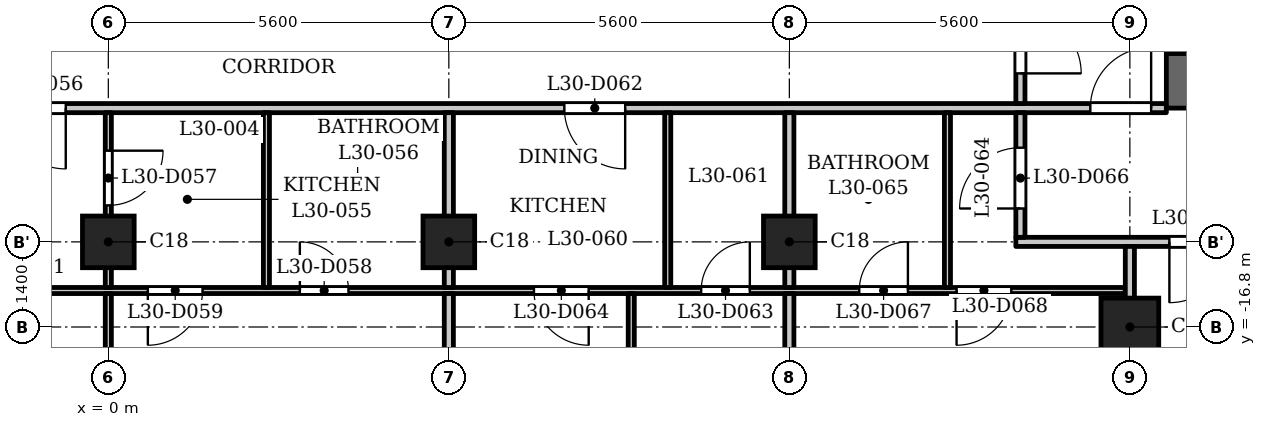
"""IFC4 building model, lengths in metres.
Left out: names, types, materials, properties, quantities, classifications, styles, units other than length and angle.
Written with IfcOpenShell. Run it as: python <this file> out.ifc"""

import sys

from ifc_helpers import new_model, si_unit, direction, frame, frame_2d, origin, origin_2d, place, context, subcontext, project, spatial, rectangle, extrude, element, fill, save


model = new_model("IFC4")
c1 = context("Model", 3, precision=1e-05, world=origin(), true_north=direction((0.0, 1.0)))
c2 = subcontext(c1, "Body", "Model", "MODEL_VIEW")
j1 = project(units=[si_unit("LENGTHUNIT", "METRE"), si_unit("PLANEANGLEUNIT", "RADIAN")], contexts=[c1])
p1 = place(None, origin())
s1 = spatial("IfcSite", under=j1, at=p1, CompositionType="ELEMENT")
p2 = place(p1, origin())
s2 = spatial("IfcBuilding", under=s1, at=p2, CompositionType="ELEMENT")
p3 = place(p2, frame((0.0, 0.0, 118.3)))
s3 = spatial("IfcBuildingStorey", under=s2, at=p3, CompositionType="ELEMENT", Elevation=118.3)
p4 = place(p3, frame((16.8, -16.8, 0.0), z_axis=(0.0, 0.0, 1.0), x_axis=(1.0, 0.0, 0.0)))
e1 = element("IfcColumn", 1, at=p4, inside=s3, PredefinedType="COLUMN", context=c2, shape_type="SweptSolid", body=[
    extrude(rectangle(XDim=0.95, YDim=0.95, at=origin_2d()), origin(), (0.0, 0.0, 1.0), 3.5),
])
for number, where, z_axis, x_axis in (
    (2, (0.0, -15.4, 0.0), (0.0, 0.0, 1.0), (1.0, 0.0, 0.0)),
    (3, (5.6, -15.4, 0.0), (0.0, 0.0, 1.0), (1.0, 0.0, 0.0)),
    (4, (11.2, -15.4, 0.0), (0.0, 0.0, 1.0), (1.0, 0.0, 0.0)),
):
    element("IfcColumn", number, at=place(p3, frame(where, z_axis=z_axis, x_axis=x_axis)), inside=s3, PredefinedType="COLUMN", context=c2, shape_type="SweptSolid", body=[
        extrude(rectangle(XDim=0.85, YDim=0.85, at=origin_2d()), origin(), (0.0, 0.0, 1.0), 3.5),
    ])
p5 = place(p3, frame((17.4, -12.75, 0.0), z_axis=(0.0, 0.0, 1.0), x_axis=(1.0, 0.0, 0.0)))
e5 = element("IfcWall", 5, at=p5, inside=s3, PredefinedType="SHEAR", context=c2, shape_type="SweptSolid", body=[
    extrude(rectangle(XDim=10.4, YDim=0.9, at=frame_2d((5.2, 0.0))), origin(), (0.0, 0.0, 1.0), 3.2),
])
p6 = place(p3, frame((17.6, -12.3, 0.0), z_axis=(0.0, 0.0, 1.0), x_axis=(0.0, 1.0, 0.0)))
e6 = element("IfcWall", 6, at=p6, inside=s3, PredefinedType="SHEAR", context=c2, shape_type="SweptSolid", body=[
    extrude(rectangle(XDim=24.6, YDim=0.4, at=frame_2d((12.3, 0.0))), origin(), (0.0, 0.0, 1.0), 3.2),
])
p7 = place(p6, frame((6.0, 0.0, 0.0)))
e7 = element("IfcOpeningElement", 7, at=p7, cuts=e6, PredefinedType="OPENING", context=c2, shape_type="SweptSolid", body=[
    extrude(rectangle(XDim=1.1, YDim=2.1, at=frame_2d((0.55, 1.05))), frame((0.0, 0.21, 0.0), z_axis=(0.0, -1.0, 0.0), x_axis=(1.0, 0.0, 0.0)), (0.0, 0.0, 1.0), 0.42),
])
p8 = place(p6, frame((8.4, 0.0, 0.0)))
e8 = element("IfcOpeningElement", 8, at=p8, cuts=e6, PredefinedType="OPENING", context=c2, shape_type="SweptSolid", body=[
    extrude(rectangle(XDim=1.1, YDim=2.1, at=frame_2d((0.55, 1.05))), frame((0.0, 0.21, 0.0), z_axis=(0.0, -1.0, 0.0), x_axis=(1.0, 0.0, 0.0)), (0.0, 0.0, 1.0), 0.42),
])
p9 = place(p6, frame((10.8, 0.0, 0.0)))
e9 = element("IfcOpeningElement", 9, at=p9, cuts=e6, PredefinedType="OPENING", context=c2, shape_type="SweptSolid", body=[
    extrude(rectangle(XDim=1.1, YDim=2.1, at=frame_2d((0.55, 1.05))), frame((0.0, 0.21, 0.0), z_axis=(0.0, -1.0, 0.0), x_axis=(1.0, 0.0, 0.0)), (0.0, 0.0, 1.0), 0.42),
])
p10 = place(p6, frame((16.75, 0.0, 0.0)))
e10 = element("IfcOpeningElement", 10, at=p10, cuts=e6, PredefinedType="OPENING", context=c2, shape_type="SweptSolid", body=[
    extrude(rectangle(XDim=0.9, YDim=2.1, at=frame_2d((0.45, 1.05))), frame((0.0, 0.21, 0.0), z_axis=(0.0, -1.0, 0.0), x_axis=(1.0, 0.0, 0.0)), (0.0, 0.0, 1.0), 0.42),
])
p11 = place(p6, frame((22.8, 0.0, 0.0)))
e11 = element("IfcOpeningElement", 11, at=p11, cuts=e6, PredefinedType="OPENING", context=c2, shape_type="SweptSolid", body=[
    extrude(rectangle(XDim=1.1, YDim=2.1, at=frame_2d((0.55, 1.05))), frame((0.0, 0.21, 0.0), z_axis=(0.0, -1.0, 0.0), x_axis=(1.0, 0.0, 0.0)), (0.0, 0.0, 1.0), 0.42),
])
p12 = place(p6, frame((0.7, 0.0, 0.0)))
e12 = element("IfcOpeningElement", 12, at=p12, cuts=e6, PredefinedType="OPENING", context=c2, shape_type="SweptSolid", body=[
    extrude(rectangle(XDim=1.1, YDim=2.1, at=frame_2d((0.55, 1.05))), frame((0.0, 0.21, 0.0), z_axis=(0.0, -1.0, 0.0), x_axis=(1.0, 0.0, 0.0)), (0.0, 0.0, 1.0), 0.42),
])
p13 = place(p6, frame((12.775, 0.0, 0.0)))
e13 = element("IfcOpeningElement", 13, at=p13, cuts=e6, PredefinedType="OPENING", context=c2, shape_type="SweptSolid", body=[
    extrude(rectangle(XDim=1.8, YDim=2.1, at=frame_2d((0.9, 1.05))), frame((0.0, 0.21, 0.0), z_axis=(0.0, -1.0, 0.0), x_axis=(1.0, 0.0, 0.0)), (0.0, 0.0, 1.0), 0.42),
])
p14 = place(p3, frame((-16.725, -16.2, 0.0), z_axis=(0.0, 0.0, 1.0), x_axis=(1.0, 0.0, 0.0)))
e14 = element("IfcWall", 14, at=p14, inside=s3, PredefinedType="PARTITIONING", context=c2, shape_type="SweptSolid", body=[
    extrude(rectangle(XDim=33.45, YDim=0.1, at=frame_2d((16.725, 0.0))), origin(), (0.0, 0.0, 1.0), 3.2),
])
p15 = place(p14, frame((4.075, 0.0, 0.0)))
e15 = element("IfcOpeningElement", 15, at=p15, cuts=e14, PredefinedType="OPENING", context=c2, shape_type="SweptSolid", body=[
    extrude(rectangle(XDim=0.8, YDim=2.1, at=frame_2d((0.4, 1.05))), frame((0.0, 0.06, 0.0), z_axis=(0.0, -1.0, 0.0), x_axis=(1.0, 0.0, 0.0)), (0.0, 0.0, 1.0), 0.12),
])
p16 = place(p14, frame((9.425, 0.0, 0.0)))
e16 = element("IfcOpeningElement", 16, at=p16, cuts=e14, PredefinedType="OPENING", context=c2, shape_type="SweptSolid", body=[
    extrude(rectangle(XDim=0.9, YDim=2.1, at=frame_2d((0.45, 1.05))), frame((0.0, 0.06, 0.0), z_axis=(0.0, -1.0, 0.0), x_axis=(1.0, 0.0, 0.0)), (0.0, 0.0, 1.0), 0.12),
])
p17 = place(p14, frame((19.875, 0.0, 0.0)))
e17 = element("IfcOpeningElement", 17, at=p17, cuts=e14, PredefinedType="OPENING", context=c2, shape_type="SweptSolid", body=[
    extrude(rectangle(XDim=0.8, YDim=2.1, at=frame_2d((0.4, 1.05))), frame((0.0, 0.06, 0.0), z_axis=(0.0, -1.0, 0.0), x_axis=(1.0, 0.0, 0.0)), (0.0, 0.0, 1.0), 0.12),
])
p18 = place(p14, frame((17.375, 0.0, 0.0)))
e18 = element("IfcOpeningElement", 18, at=p18, cuts=e14, PredefinedType="OPENING", context=c2, shape_type="SweptSolid", body=[
    extrude(rectangle(XDim=0.9, YDim=2.1, at=frame_2d((0.45, 1.05))), frame((0.0, 0.06, 0.0), z_axis=(0.0, -1.0, 0.0), x_axis=(1.0, 0.0, 0.0)), (0.0, 0.0, 1.0), 0.12),
])
p19 = place(p14, frame((12.525, 0.0, 0.0)))
e19 = element("IfcOpeningElement", 19, at=p19, cuts=e14, PredefinedType="OPENING", context=c2, shape_type="SweptSolid", body=[
    extrude(rectangle(XDim=0.9, YDim=2.1, at=frame_2d((0.45, 1.05))), frame((0.0, 0.06, 0.0), z_axis=(0.0, -1.0, 0.0), x_axis=(1.0, 0.0, 0.0)), (0.0, 0.0, 1.0), 0.12),
])
p20 = place(p14, frame((14.775, 0.0, 0.0)))
e20 = element("IfcOpeningElement", 20, at=p20, cuts=e14, PredefinedType="OPENING", context=c2, shape_type="SweptSolid", body=[
    extrude(rectangle(XDim=0.9, YDim=2.1, at=frame_2d((0.45, 1.05))), frame((0.0, 0.06, 0.0), z_axis=(0.0, -1.0, 0.0), x_axis=(1.0, 0.0, 0.0)), (0.0, 0.0, 1.0), 0.12),
])
p21 = place(p14, frame((26.475, 0.0, 0.0)))
e21 = element("IfcOpeningElement", 21, at=p21, cuts=e14, PredefinedType="OPENING", context=c2, shape_type="SweptSolid", body=[
    extrude(rectangle(XDim=0.8, YDim=2.1, at=frame_2d((0.4, 1.05))), frame((0.0, 0.06, 0.0), z_axis=(0.0, -1.0, 0.0), x_axis=(1.0, 0.0, 0.0)), (0.0, 0.0, 1.0), 0.12),
])
p22 = place(p14, frame((23.725, 0.0, 0.0)))
e22 = element("IfcOpeningElement", 22, at=p22, cuts=e14, PredefinedType="OPENING", context=c2, shape_type="SweptSolid", body=[
    extrude(rectangle(XDim=0.9, YDim=2.1, at=frame_2d((0.45, 1.05))), frame((0.0, 0.06, 0.0), z_axis=(0.0, -1.0, 0.0), x_axis=(1.0, 0.0, 0.0)), (0.0, 0.0, 1.0), 0.12),
])
p23 = place(p14, frame((29.075, 0.0, 0.0)))
e23 = element("IfcOpeningElement", 23, at=p23, cuts=e14, PredefinedType="OPENING", context=c2, shape_type="SweptSolid", body=[
    extrude(rectangle(XDim=0.8, YDim=2.1, at=frame_2d((0.4, 1.05))), frame((0.0, 0.06, 0.0), z_axis=(0.0, -1.0, 0.0), x_axis=(1.0, 0.0, 0.0)), (0.0, 0.0, 1.0), 0.12),
])
p24 = place(p14, frame((30.675, 0.0, 0.0)))
e24 = element("IfcOpeningElement", 24, at=p24, cuts=e14, PredefinedType="OPENING", context=c2, shape_type="SweptSolid", body=[
    extrude(rectangle(XDim=0.9, YDim=2.1, at=frame_2d((0.45, 1.05))), frame((0.0, 0.06, 0.0), z_axis=(0.0, -1.0, 0.0), x_axis=(1.0, 0.0, 0.0)), (0.0, 0.0, 1.0), 0.12),
])
p25 = place(p3, frame((14.925, -15.4, 0.0), z_axis=(0.0, 0.0, 1.0), x_axis=(1.0, 0.0, 0.0)))
e25 = element("IfcWall", 25, at=p25, inside=s3, PredefinedType="PARTITIONING", context=c2, shape_type="SweptSolid", body=[
    extrude(rectangle(XDim=12.559, YDim=0.15, at=frame_2d((6.279, 0.0))), origin(), (0.0, 0.0, 1.0), 3.2),
])
p26 = place(p25, frame((2.525, 0.0, 0.0)))
e26 = element("IfcOpeningElement", 26, at=p26, cuts=e25, PredefinedType="OPENING", context=c2, shape_type="SweptSolid", body=[
    extrude(rectangle(XDim=1.0, YDim=2.1, at=frame_2d((0.5, 1.05))), frame((0.0, 0.085, 0.0), z_axis=(0.0, -1.0, 0.0), x_axis=(1.0, 0.0, 0.0)), (0.0, 0.0, 1.0), 0.17),
])
p27 = place(p3, frame((-17.4, -13.2, 0.0), z_axis=(0.0, 0.0, 1.0), x_axis=(1.0, 0.0, 0.0)))
e27 = element("IfcWall", 27, at=p27, inside=s3, PredefinedType="PARTITIONING", context=c2, shape_type="SweptSolid", body=[
    extrude(rectangle(XDim=34.8, YDim=0.15, at=frame_2d((17.4, 0.0))), origin(), (0.0, 0.0, 1.0), 3.2),
])
p28 = place(p27, frame((0.15, 0.0, 0.0)))
e28 = element("IfcOpeningElement", 28, at=p28, cuts=e27, PredefinedType="OPENING", context=c2, shape_type="SweptSolid", body=[
    extrude(rectangle(XDim=1.0, YDim=2.1, at=frame_2d((0.5, 1.05))), frame((0.0, 0.085, 0.0), z_axis=(0.0, -1.0, 0.0), x_axis=(1.0, 0.0, 0.0)), (0.0, 0.0, 1.0), 0.17),
])
p29 = place(p27, frame((33.55, 0.0, 0.0)))
e29 = element("IfcOpeningElement", 29, at=p29, cuts=e27, PredefinedType="OPENING", context=c2, shape_type="SweptSolid", body=[
    extrude(rectangle(XDim=1.0, YDim=2.1, at=frame_2d((0.5, 1.05))), frame((0.0, 0.085, 0.0), z_axis=(0.0, -1.0, 0.0), x_axis=(1.0, 0.0, 0.0)), (0.0, 0.0, 1.0), 0.17),
])
p30 = place(p27, frame((10.1, 0.0, 0.0)))
e30 = element("IfcOpeningElement", 30, at=p30, cuts=e27, PredefinedType="OPENING", context=c2, shape_type="SweptSolid", body=[
    extrude(rectangle(XDim=1.0, YDim=2.1, at=frame_2d((0.5, 1.05))), frame((0.0, 0.085, 0.0), z_axis=(0.0, -1.0, 0.0), x_axis=(1.0, 0.0, 0.0)), (0.0, 0.0, 1.0), 0.17),
])
p31 = place(p27, frame((15.7, 0.0, 0.0)))
e31 = element("IfcOpeningElement", 31, at=p31, cuts=e27, PredefinedType="OPENING", context=c2, shape_type="SweptSolid", body=[
    extrude(rectangle(XDim=1.0, YDim=2.1, at=frame_2d((0.5, 1.05))), frame((0.0, 0.085, 0.0), z_axis=(0.0, -1.0, 0.0), x_axis=(1.0, 0.0, 0.0)), (0.0, 0.0, 1.0), 0.17),
])
p32 = place(p27, frame((24.9, 0.0, 0.0)))
e32 = element("IfcOpeningElement", 32, at=p32, cuts=e27, PredefinedType="OPENING", context=c2, shape_type="SweptSolid", body=[
    extrude(rectangle(XDim=1.0, YDim=2.1, at=frame_2d((0.5, 1.05))), frame((0.0, 0.085, 0.0), z_axis=(0.0, -1.0, 0.0), x_axis=(1.0, 0.0, 0.0)), (0.0, 0.0, 1.0), 0.17),
])
p33 = place(p3, frame((0.0, -22.98, 0.0), z_axis=(0.0, 0.0, 1.0), x_axis=(0.0, 1.0, 0.0)))
e33 = element("IfcWall", 33, at=p33, inside=s3, PredefinedType="PARTITIONING", context=c2, shape_type="SweptSolid", body=[
    extrude(rectangle(XDim=6.73, YDim=0.1, at=frame_2d((3.365, 0.0))), origin(), (0.0, 0.0, 1.0), 3.2),
])
p34 = place(p3, frame((0.0, -16.15, 0.0), z_axis=(0.0, 0.0, 1.0), x_axis=(0.0, 1.0, 0.0)))
e34 = element("IfcWall", 34, at=p34, inside=s3, PredefinedType="PARTITIONING", context=c2, shape_type="SweptSolid", body=[
    extrude(rectangle(XDim=2.875, YDim=0.1, at=frame_2d((1.438, 0.0))), origin(), (0.0, 0.0, 1.0), 3.2),
])
p35 = place(p34, frame((1.35, 0.0, 0.0)))
e35 = element("IfcOpeningElement", 35, at=p35, cuts=e34, PredefinedType="OPENING", context=c2, shape_type="SweptSolid", body=[
    extrude(rectangle(XDim=0.9, YDim=2.1, at=frame_2d((0.45, 1.05))), frame((0.0, 0.06, 0.0), z_axis=(0.0, -1.0, 0.0), x_axis=(1.0, 0.0, 0.0)), (0.0, 0.0, 1.0), 0.12),
])
p36 = place(p3, frame((2.6, -16.15, 0.0), z_axis=(0.0, 0.0, 1.0), x_axis=(0.0, 1.0, 0.0)))
e36 = element("IfcWall", 36, at=p36, inside=s3, PredefinedType="PARTITIONING", context=c2, shape_type="SweptSolid", body=[
    extrude(rectangle(XDim=2.875, YDim=0.1, at=frame_2d((1.438, 0.0))), origin(), (0.0, 0.0, 1.0), 3.2),
])
p37 = place(p3, frame((5.6, -22.98, 0.0), z_axis=(0.0, 0.0, 1.0), x_axis=(0.0, 1.0, 0.0)))
e37 = element("IfcWall", 37, at=p37, inside=s3, PredefinedType="PARTITIONING", context=c2, shape_type="SweptSolid", body=[
    extrude(rectangle(XDim=6.73, YDim=0.15, at=frame_2d((3.365, 0.0))), origin(), (0.0, 0.0, 1.0), 3.2),
])
p38 = place(p3, frame((5.6, -16.15, 0.0), z_axis=(0.0, 0.0, 1.0), x_axis=(0.0, 1.0, 0.0)))
e38 = element("IfcWall", 38, at=p38, inside=s3, PredefinedType="PARTITIONING", context=c2, shape_type="SweptSolid", body=[
    extrude(rectangle(XDim=2.875, YDim=0.15, at=frame_2d((1.438, 0.0))), origin(), (0.0, 0.0, 1.0), 3.2),
])
p39 = place(p3, frame((8.6, -22.08, 0.0), z_axis=(0.0, 0.0, 1.0), x_axis=(0.0, 1.0, 0.0)))
e39 = element("IfcWall", 39, at=p39, inside=s3, PredefinedType="PARTITIONING", context=c2, shape_type="SweptSolid", body=[
    extrude(rectangle(XDim=5.83, YDim=0.1, at=frame_2d((2.915, 0.0))), origin(), (0.0, 0.0, 1.0), 3.2),
])
p40 = place(p39, frame((0.42, 0.0, 0.0)))
e40 = element("IfcOpeningElement", 40, at=p40, cuts=e39, PredefinedType="OPENING", context=c2, shape_type="SweptSolid", body=[
    extrude(rectangle(XDim=0.9, YDim=2.1, at=frame_2d((0.45, 1.05))), frame((0.0, 0.06, 0.0), z_axis=(0.0, -1.0, 0.0), x_axis=(1.0, 0.0, 0.0)), (0.0, 0.0, 1.0), 0.12),
])
p41 = place(p3, frame((9.2, -16.15, 0.0), z_axis=(0.0, 0.0, 1.0), x_axis=(0.0, 1.0, 0.0)))
e41 = element("IfcWall", 41, at=p41, inside=s3, PredefinedType="PARTITIONING", context=c2, shape_type="SweptSolid", body=[
    extrude(rectangle(XDim=2.875, YDim=0.1, at=frame_2d((1.438, 0.0))), origin(), (0.0, 0.0, 1.0), 3.2),
])
p42 = place(p3, frame((11.2, -22.98, 0.0), z_axis=(0.0, 0.0, 1.0), x_axis=(0.0, 1.0, 0.0)))
e42 = element("IfcWall", 42, at=p42, inside=s3, PredefinedType="PARTITIONING", context=c2, shape_type="SweptSolid", body=[
    extrude(rectangle(XDim=6.73, YDim=0.15, at=frame_2d((3.365, 0.0))), origin(), (0.0, 0.0, 1.0), 3.2),
])
p43 = place(p3, frame((11.2, -16.15, 0.0), z_axis=(0.0, 0.0, 1.0), x_axis=(0.0, 1.0, 0.0)))
e43 = element("IfcWall", 43, at=p43, inside=s3, PredefinedType="PARTITIONING", context=c2, shape_type="SweptSolid", body=[
    extrude(rectangle(XDim=2.875, YDim=0.15, at=frame_2d((1.438, 0.0))), origin(), (0.0, 0.0, 1.0), 3.2),
])
p44 = place(p3, frame((13.8, -16.15, 0.0), z_axis=(0.0, 0.0, 1.0), x_axis=(0.0, 1.0, 0.0)))
e44 = element("IfcWall", 44, at=p44, inside=s3, PredefinedType="PARTITIONING", context=c2, shape_type="SweptSolid", body=[
    extrude(rectangle(XDim=2.875, YDim=0.1, at=frame_2d((1.438, 0.0))), origin(), (0.0, 0.0, 1.0), 3.2),
])
p45 = place(p3, frame((15.0, -15.325, 0.0), z_axis=(0.0, 0.0, 1.0), x_axis=(0.0, 1.0, 0.0)))
e45 = element("IfcWall", 45, at=p45, inside=s3, PredefinedType="PARTITIONING", context=c2, shape_type="SweptSolid", body=[
    extrude(rectangle(XDim=2.05, YDim=0.15, at=frame_2d((1.025, 0.0))), origin(), (0.0, 0.0, 1.0), 3.2),
])
p46 = place(p45, frame((0.474, 0.0, 0.0)))
e46 = element("IfcOpeningElement", 46, at=p46, cuts=e45, PredefinedType="OPENING", context=c2, shape_type="SweptSolid", body=[
    extrude(rectangle(XDim=1.0, YDim=2.1, at=frame_2d((0.5, 1.05))), frame((0.0, 0.085, 0.0), z_axis=(0.0, -1.0, 0.0), x_axis=(1.0, 0.0, 0.0)), (0.0, 0.0, 1.0), 0.17),
])
p47 = place(p3, frame((15.0, -13.125, 0.0), z_axis=(0.0, 0.0, 1.0), x_axis=(0.0, 1.0, 0.0)))
e47 = element("IfcWall", 47, at=p47, inside=s3, PredefinedType="PARTITIONING", context=c2, shape_type="SweptSolid", body=[
    extrude(rectangle(XDim=6.356, YDim=0.15, at=frame_2d((3.178, 0.0))), origin(), (0.0, 0.0, 1.0), 3.2),
])
p48 = place(p47, frame((0.496, 0.0, 0.0)))
e48 = element("IfcOpeningElement", 48, at=p48, cuts=e47, PredefinedType="OPENING", context=c2, shape_type="SweptSolid", body=[
    extrude(rectangle(XDim=1.0, YDim=2.1, at=frame_2d((0.5, 1.05))), frame((0.0, 0.085, 0.0), z_axis=(0.0, -1.0, 0.0), x_axis=(1.0, 0.0, 0.0)), (0.0, 0.0, 1.0), 0.17),
])
p49 = place(p3, frame((16.8, -22.98, 0.0), z_axis=(0.0, 0.0, 1.0), x_axis=(0.0, 1.0, 0.0)))
e49 = element("IfcWall", 49, at=p49, inside=s3, PredefinedType="PARTITIONING", context=c2, shape_type="SweptSolid", body=[
    extrude(rectangle(XDim=7.505, YDim=0.15, at=frame_2d((3.752, 0.0))), origin(), (0.0, 0.0, 1.0), 3.2),
])
p50 = place(p48, origin())
e50 = element("IfcDoor", 50, at=p50, inside=s3, OperationType="SINGLE_SWING_LEFT", PredefinedType="DOOR", context=c2, shape_type="SweptSolid", body=[
    extrude(rectangle(XDim=1.0, YDim=2.1, at=frame_2d((0.5, 1.05))), frame((0.0, 0.025, 0.0), z_axis=(0.0, -1.0, 0.0), x_axis=(1.0, 0.0, 0.0)), (0.0, 0.0, 1.0), 0.05),
])
fill(e48, e50)
p51 = place(p29, origin())
e51 = element("IfcDoor", 51, at=p51, inside=s3, OperationType="SINGLE_SWING_LEFT", PredefinedType="DOOR", context=c2, shape_type="SweptSolid", body=[
    extrude(rectangle(XDim=1.0, YDim=2.1, at=frame_2d((0.5, 1.05))), frame((0.0, 0.025, 0.0), z_axis=(0.0, -1.0, 0.0), x_axis=(1.0, 0.0, 0.0)), (0.0, 0.0, 1.0), 0.05),
])
fill(e29, e51)
p52 = place(p31, origin())
e52 = element("IfcDoor", 52, at=p52, inside=s3, OperationType="SINGLE_SWING_RIGHT", PredefinedType="DOOR", context=c2, shape_type="SweptSolid", body=[
    extrude(rectangle(XDim=1.0, YDim=2.1, at=frame_2d((0.5, 1.05))), frame((0.0, 0.025, 0.0), z_axis=(0.0, -1.0, 0.0), x_axis=(1.0, 0.0, 0.0)), (0.0, 0.0, 1.0), 0.05),
])
fill(e31, e52)
p53 = place(p35, origin())
e53 = element("IfcDoor", 53, at=p53, inside=s3, OperationType="SINGLE_SWING_RIGHT", PredefinedType="DOOR", context=c2, shape_type="SweptSolid", body=[
    extrude(rectangle(XDim=0.9, YDim=2.1, at=frame_2d((0.45, 1.05))), frame((0.0, 0.025, 0.0), z_axis=(0.0, -1.0, 0.0), x_axis=(1.0, 0.0, 0.0)), (0.0, 0.0, 1.0), 0.05),
])
fill(e35, e53)
p54 = place(p17, origin())
e54 = element("IfcDoor", 54, at=p54, inside=s3, OperationType="SINGLE_SWING_RIGHT", PredefinedType="DOOR", context=c2, shape_type="SweptSolid", body=[
    extrude(rectangle(XDim=0.8, YDim=2.1, at=frame_2d((0.4, 1.05))), frame((0.0, 0.025, 0.0), z_axis=(0.0, -1.0, 0.0), x_axis=(1.0, 0.0, 0.0)), (0.0, 0.0, 1.0), 0.05),
])
fill(e17, e54)
p55 = place(p18, origin())
e55 = element("IfcDoor", 55, at=p55, inside=s3, OperationType="SINGLE_SWING_LEFT", PredefinedType="DOOR", context=c2, shape_type="SweptSolid", body=[
    extrude(rectangle(XDim=0.9, YDim=2.1, at=frame_2d((0.45, 1.05))), frame((0.0, 0.025, 0.0), z_axis=(0.0, -1.0, 0.0), x_axis=(1.0, 0.0, 0.0)), (0.0, 0.0, 1.0), 0.05),
])
fill(e18, e55)
p56 = place(p32, origin())
e56 = element("IfcDoor", 56, at=p56, inside=s3, OperationType="SINGLE_SWING_RIGHT", PredefinedType="DOOR", context=c2, shape_type="SweptSolid", body=[
    extrude(rectangle(XDim=1.0, YDim=2.1, at=frame_2d((0.5, 1.05))), frame((0.0, 0.025, 0.0), z_axis=(0.0, -1.0, 0.0), x_axis=(1.0, 0.0, 0.0)), (0.0, 0.0, 1.0), 0.05),
])
fill(e32, e56)
p57 = place(p21, origin())
e57 = element("IfcDoor", 57, at=p57, inside=s3, OperationType="SINGLE_SWING_LEFT", PredefinedType="DOOR", context=c2, shape_type="SweptSolid", body=[
    extrude(rectangle(XDim=0.8, YDim=2.1, at=frame_2d((0.4, 1.05))), frame((0.0, 0.025, 0.0), z_axis=(0.0, -1.0, 0.0), x_axis=(1.0, 0.0, 0.0)), (0.0, 0.0, 1.0), 0.05),
])
fill(e21, e57)
p58 = place(p22, origin())
e58 = element("IfcDoor", 58, at=p58, inside=s3, OperationType="SINGLE_SWING_RIGHT", PredefinedType="DOOR", context=c2, shape_type="SweptSolid", body=[
    extrude(rectangle(XDim=0.9, YDim=2.1, at=frame_2d((0.45, 1.05))), frame((0.0, 0.025, 0.0), z_axis=(0.0, -1.0, 0.0), x_axis=(1.0, 0.0, 0.0)), (0.0, 0.0, 1.0), 0.05),
])
fill(e22, e58)
p59 = place(p46, origin())
e59 = element("IfcDoor", 59, at=p59, inside=s3, OperationType="SINGLE_SWING_RIGHT", PredefinedType="DOOR", context=c2, shape_type="SweptSolid", body=[
    extrude(rectangle(XDim=1.0, YDim=2.1, at=frame_2d((0.5, 1.05))), frame((0.0, 0.025, 0.0), z_axis=(0.0, -1.0, 0.0), x_axis=(1.0, 0.0, 0.0)), (0.0, 0.0, 1.0), 0.05),
])
fill(e46, e59)
p60 = place(p23, origin())
e60 = element("IfcDoor", 60, at=p60, inside=s3, OperationType="SINGLE_SWING_LEFT", PredefinedType="DOOR", context=c2, shape_type="SweptSolid", body=[
    extrude(rectangle(XDim=0.8, YDim=2.1, at=frame_2d((0.4, 1.05))), frame((0.0, 0.025, 0.0), z_axis=(0.0, -1.0, 0.0), x_axis=(1.0, 0.0, 0.0)), (0.0, 0.0, 1.0), 0.05),
])
fill(e23, e60)
p61 = place(p24, origin())
e61 = element("IfcDoor", 61, at=p61, inside=s3, OperationType="SINGLE_SWING_LEFT", PredefinedType="DOOR", context=c2, shape_type="SweptSolid", body=[
    extrude(rectangle(XDim=0.9, YDim=2.1, at=frame_2d((0.45, 1.05))), frame((0.0, 0.025, 0.0), z_axis=(0.0, -1.0, 0.0), x_axis=(1.0, 0.0, 0.0)), (0.0, 0.0, 1.0), 0.05),
])
fill(e24, e61)
p62 = place(p26, origin())
e62 = element("IfcDoor", 62, at=p62, inside=s3, OperationType="SINGLE_SWING_LEFT", PredefinedType="DOOR", context=c2, shape_type="SweptSolid", body=[
    extrude(rectangle(XDim=1.0, YDim=2.1, at=frame_2d((0.5, 1.05))), frame((0.0, 0.025, 0.0), z_axis=(0.0, -1.0, 0.0), x_axis=(1.0, 0.0, 0.0)), (0.0, 0.0, 1.0), 0.05),
])
fill(e26, e62)
save(model, sys.argv[1])
